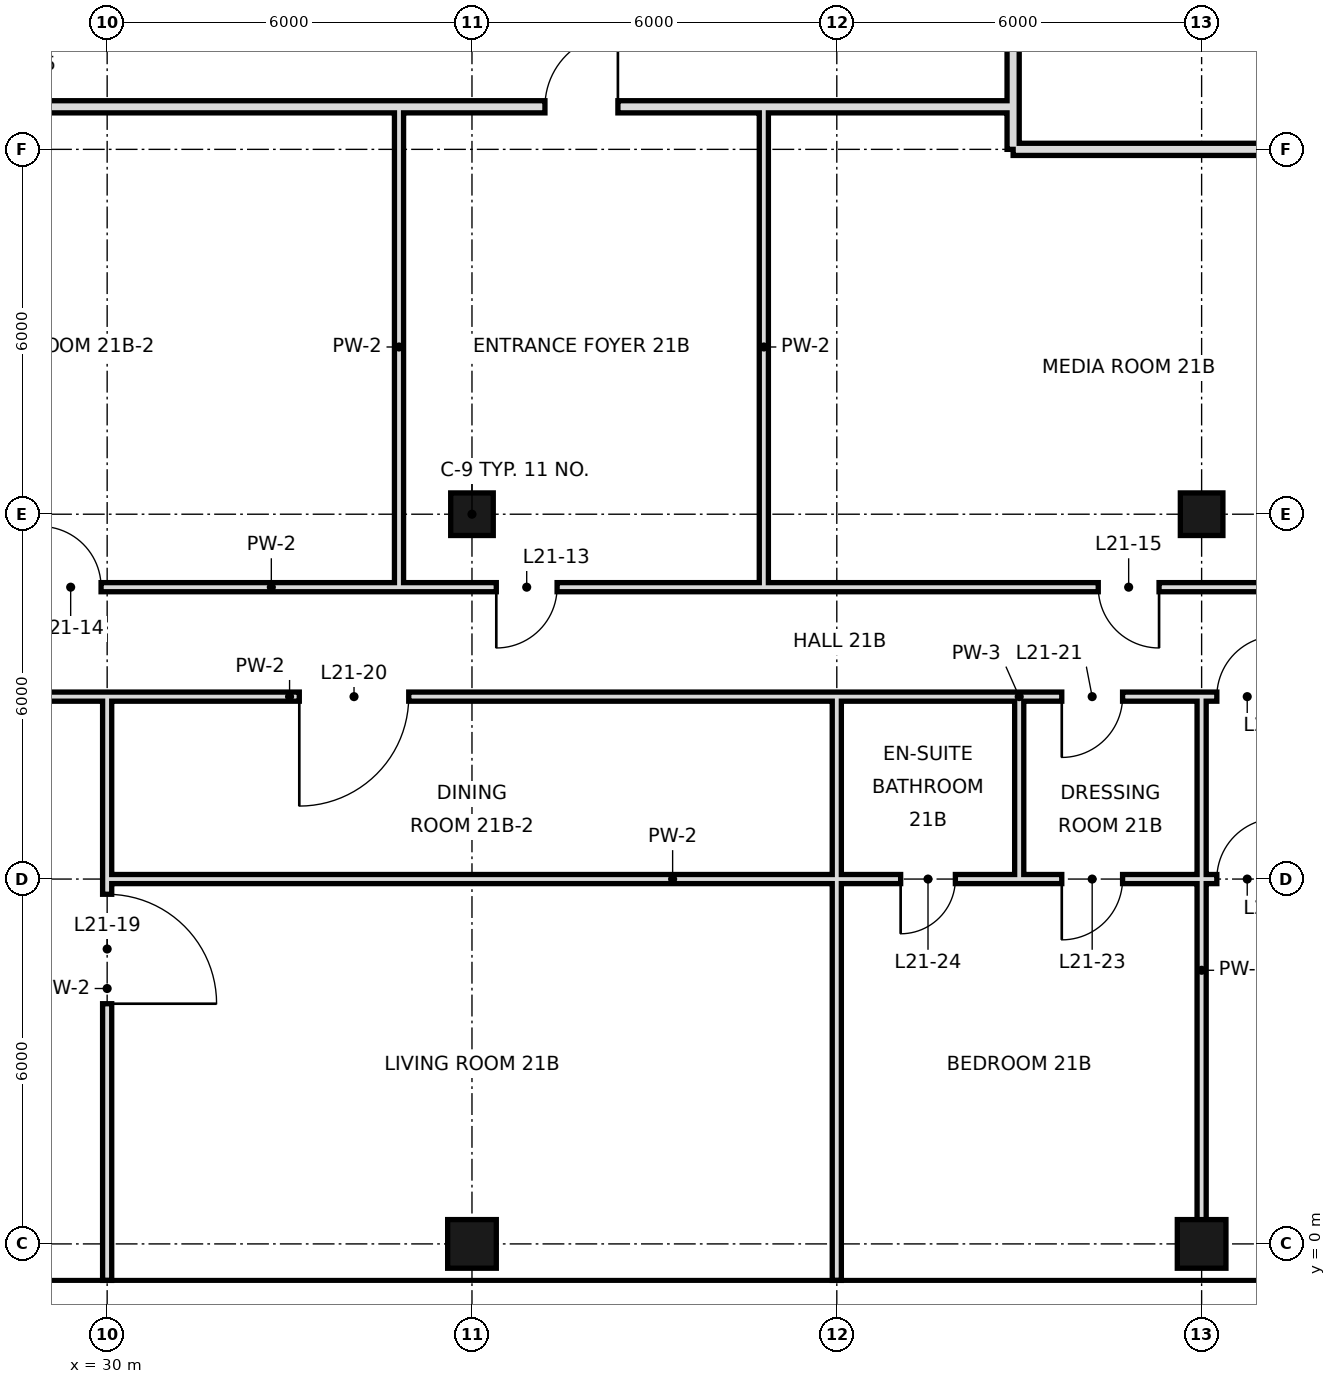
"""IFC4 building model, lengths in metres.
Left out: names, types, materials, properties, quantities, classifications, styles, units other than length and angle.
Written with IfcOpenShell. Run it as: python <this file> out.ifc"""

import sys

from ifc_helpers import new_model, si_unit, direction, frame, frame_2d, origin, origin_2d, place, context, subcontext, project, spatial, rectangle, hollow_rectangle, extrude, element, fill, save


model = new_model("IFC4")
c1 = context("Model", 3, precision=1e-05, world=origin(), true_north=direction((0.0, 1.0)))
c2 = subcontext(c1, "Body", "Model", "MODEL_VIEW")
j1 = project(units=[si_unit("LENGTHUNIT", "METRE"), si_unit("PLANEANGLEUNIT", "RADIAN")], contexts=[c1])
p1 = place(None, origin())
s1 = spatial("IfcSite", under=j1, at=p1, CompositionType="ELEMENT")
p2 = place(p1, origin())
s2 = spatial("IfcBuilding", under=s1, at=p2, CompositionType="ELEMENT")
p3 = place(p2, frame((0.0, 0.0, 99.8)))
s3 = spatial("IfcBuildingStorey", under=s2, at=p3, CompositionType="ELEMENT", Elevation=99.8)
p4 = place(p3, frame((36.0, 0.0, 0.0), z_axis=(0.0, 0.0, 1.0), x_axis=(1.0, 0.0, 0.0)))
e1 = element("IfcColumn", 1, at=p4, inside=s3, PredefinedType="COLUMN", context=c2, shape_type="SweptSolid", body=[
    extrude(hollow_rectangle(XDim=0.8, YDim=0.8, WallThickness=0.04, at=origin_2d()), origin(), (0.0, 0.0, 1.0), 3.6),
])
p5 = place(p3, frame((36.0, 12.0, 0.0), z_axis=(0.0, 0.0, 1.0), x_axis=(1.0, 0.0, 0.0)))
e2 = element("IfcColumn", 2, at=p5, inside=s3, PredefinedType="COLUMN", context=c2, shape_type="SweptSolid", body=[
    extrude(hollow_rectangle(XDim=0.7, YDim=0.7, WallThickness=0.036, at=origin_2d()), origin(), (0.0, 0.0, 1.0), 3.6),
])
p6 = place(p3, frame((48.0, 0.0, 0.0), z_axis=(0.0, 0.0, 1.0), x_axis=(1.0, 0.0, 0.0)))
e3 = element("IfcColumn", 3, at=p6, inside=s3, PredefinedType="COLUMN", context=c2, shape_type="SweptSolid", body=[
    extrude(hollow_rectangle(XDim=0.8, YDim=0.8, WallThickness=0.04, at=origin_2d()), origin(), (0.0, 0.0, 1.0), 3.6),
])
p7 = place(p3, frame((48.0, 12.0, 0.0), z_axis=(0.0, 0.0, 1.0), x_axis=(1.0, 0.0, 0.0)))
e4 = element("IfcColumn", 4, at=p7, inside=s3, PredefinedType="COLUMN", context=c2, shape_type="SweptSolid", body=[
    extrude(hollow_rectangle(XDim=0.7, YDim=0.7, WallThickness=0.036, at=origin_2d()), origin(), (0.0, 0.0, 1.0), 3.6),
])
p8 = place(p3, frame((30.0, -0.6, 0.0), z_axis=(0.0, 0.0, 1.0), x_axis=(0.0, 1.0, 0.0)))
e5 = element("IfcWall", 5, at=p8, inside=s3, PredefinedType="PARTITIONING", context=c2, shape_type="SweptSolid", body=[
    extrude(rectangle(XDim=9.6, YDim=0.15, at=frame_2d((4.8, 0.0))), origin(), (0.0, 0.0, 1.0), 3.42),
])
p9 = place(p8, frame((4.55, 0.0, 0.0)))
e6 = element("IfcOpeningElement", 6, at=p9, cuts=e5, PredefinedType="OPENING", context=c2, shape_type="SweptSolid", body=[
    extrude(rectangle(XDim=1.8, YDim=2.4, at=frame_2d((0.9, 1.2))), frame((0.0, 0.085, 0.0), z_axis=(0.0, -1.0, 0.0), x_axis=(1.0, 0.0, 0.0)), (0.0, 0.0, 1.0), 0.17),
])
for number, where, z_axis, x_axis in (
    (7, (34.8, 10.8, 0.0), (0.0, 0.0, 1.0), (0.0, 1.0, 0.0)),
    (8, (40.8, 10.8, 0.0), (0.0, 0.0, 1.0), (0.0, 1.0, 0.0)),
):
    element("IfcWall", number, at=place(p3, frame(where, z_axis=z_axis, x_axis=x_axis)), inside=s3, PredefinedType="PARTITIONING", context=c2, shape_type="SweptSolid", body=[
        extrude(rectangle(XDim=7.9, YDim=0.15, at=frame_2d((3.95, 0.0))), origin(), (0.0, 0.0, 1.0), 3.42),
    ])
p10 = place(p3, frame((42.0, -0.6, 0.0), z_axis=(0.0, 0.0, 1.0), x_axis=(0.0, 1.0, 0.0)))
e9 = element("IfcWall", 9, at=p10, inside=s3, PredefinedType="PARTITIONING", context=c2, shape_type="SweptSolid", body=[
    extrude(rectangle(XDim=6.6, YDim=0.15, at=frame_2d((3.3, 0.0))), origin(), (0.0, 0.0, 1.0), 3.42),
])
p11 = place(p3, frame((42.0, 6.0, 0.0), z_axis=(0.0, 0.0, 1.0), x_axis=(0.0, 1.0, 0.0)))
e10 = element("IfcWall", 10, at=p11, inside=s3, PredefinedType="PARTITIONING", context=c2, shape_type="SweptSolid", body=[
    extrude(rectangle(XDim=3.0, YDim=0.15, at=frame_2d((1.5, 0.0))), origin(), (0.0, 0.0, 1.0), 3.42),
])
p12 = place(p3, frame((44.9, 18.0, 0.0), z_axis=(0.0, 0.0, 1.0), x_axis=(0.0, 1.0, 0.0)))
e11 = element("IfcWall", 11, at=p12, inside=s3, PredefinedType="SOLIDWALL", context=c2, shape_type="SweptSolid", body=[
    extrude(rectangle(XDim=4.2, YDim=0.2, at=frame_2d((2.1, 0.0))), origin(), (0.0, 0.0, 1.0), 2.97),
])
p13 = place(p3, frame((45.0, 6.0, 0.0), z_axis=(0.0, 0.0, 1.0), x_axis=(0.0, 1.0, 0.0)))
e12 = element("IfcWall", 12, at=p13, inside=s3, PredefinedType="PARTITIONING", context=c2, shape_type="SweptSolid", body=[
    extrude(rectangle(XDim=3.0, YDim=0.15, at=frame_2d((1.5, 0.0))), origin(), (0.0, 0.0, 1.0), 3.42),
])
p14 = place(p3, frame((48.0, 0.0, 0.0), z_axis=(0.0, 0.0, 1.0), x_axis=(0.0, 1.0, 0.0)))
e13 = element("IfcWall", 13, at=p14, inside=s3, PredefinedType="PARTITIONING", context=c2, shape_type="SweptSolid", body=[
    extrude(rectangle(XDim=9.0, YDim=0.15, at=frame_2d((4.5, 0.0))), origin(), (0.0, 0.0, 1.0), 2.72),
])
p15 = place(p3, frame((12.6, 10.8, 0.0), z_axis=(0.0, 0.0, 1.0), x_axis=(1.0, 0.0, 0.0)))
e14 = element("IfcWall", 14, at=p15, inside=s3, PredefinedType="PARTITIONING", context=c2, shape_type="SweptSolid", body=[
    extrude(rectangle(XDim=40.2, YDim=0.15, at=frame_2d((20.1, 0.0))), origin(), (0.0, 0.0, 1.0), 3.42),
])
p16 = place(p15, frame((8.5, 0.0, 0.0)))
e15 = element("IfcOpeningElement", 15, at=p16, cuts=e14, PredefinedType="OPENING", context=c2, shape_type="SweptSolid", body=[
    extrude(rectangle(XDim=1.0, YDim=2.4, at=frame_2d((0.5, 1.2))), frame((0.0, 0.085, 0.0), z_axis=(0.0, -1.0, 0.0), x_axis=(1.0, 0.0, 0.0)), (0.0, 0.0, 1.0), 0.17),
])
p17 = place(p15, frame((1.78, 0.0, 0.0)))
e16 = element("IfcOpeningElement", 16, at=p17, cuts=e14, PredefinedType="OPENING", context=c2, shape_type="SweptSolid", body=[
    extrude(rectangle(XDim=1.0, YDim=2.4, at=frame_2d((0.5, 1.2))), frame((0.0, 0.085, 0.0), z_axis=(0.0, -1.0, 0.0), x_axis=(1.0, 0.0, 0.0)), (0.0, 0.0, 1.0), 0.17),
])
p18 = place(p15, frame((23.8, 0.0, 0.0)))
e17 = element("IfcOpeningElement", 17, at=p18, cuts=e14, PredefinedType="OPENING", context=c2, shape_type="SweptSolid", body=[
    extrude(rectangle(XDim=1.0, YDim=2.4, at=frame_2d((0.5, 1.2))), frame((0.0, 0.085, 0.0), z_axis=(0.0, -1.0, 0.0), x_axis=(1.0, 0.0, 0.0)), (0.0, 0.0, 1.0), 0.17),
])
p19 = place(p15, frame((16.3, 0.0, 0.0)))
e18 = element("IfcOpeningElement", 18, at=p19, cuts=e14, PredefinedType="OPENING", context=c2, shape_type="SweptSolid", body=[
    extrude(rectangle(XDim=1.0, YDim=2.4, at=frame_2d((0.5, 1.2))), frame((0.0, 0.085, 0.0), z_axis=(0.0, -1.0, 0.0), x_axis=(1.0, 0.0, 0.0)), (0.0, 0.0, 1.0), 0.17),
])
p20 = place(p15, frame((33.7, 0.0, 0.0)))
e19 = element("IfcOpeningElement", 19, at=p20, cuts=e14, PredefinedType="OPENING", context=c2, shape_type="SweptSolid", body=[
    extrude(rectangle(XDim=1.0, YDim=2.4, at=frame_2d((0.5, 1.2))), frame((0.0, 0.085, 0.0), z_axis=(0.0, -1.0, 0.0), x_axis=(1.0, 0.0, 0.0)), (0.0, 0.0, 1.0), 0.17),
])
p21 = place(p3, frame((44.9, 18.0, 0.0), z_axis=(0.0, 0.0, 1.0), x_axis=(1.0, 0.0, 0.0)))
e20 = element("IfcWall", 20, at=p21, inside=s3, PredefinedType="SOLIDWALL", context=c2, shape_type="SweptSolid", body=[
    extrude(rectangle(XDim=4.3, YDim=0.2, at=frame_2d((2.15, 0.0))), origin(), (0.0, 0.0, 1.0), 2.72),
])
p22 = place(p3, frame((12.6, 18.7, 0.0), z_axis=(0.0, 0.0, 1.0), x_axis=(1.0, 0.0, 0.0)))
e21 = element("IfcWall", 21, at=p22, inside=s3, PredefinedType="SOLIDWALL", context=c2, shape_type="SweptSolid", body=[
    extrude(rectangle(XDim=32.3, YDim=0.2, at=frame_2d((16.15, 0.0))), origin(), (0.0, 0.0, 1.0), 2.72),
])
p23 = place(p22, frame((7.78, 0.0, 0.0)))
e22 = element("IfcOpeningElement", 22, at=p23, cuts=e21, PredefinedType="OPENING", context=c2, shape_type="SweptSolid", body=[
    extrude(rectangle(XDim=1.2, YDim=2.4, at=frame_2d((0.6, 1.2))), frame((0.0, 0.11, 0.0), z_axis=(0.0, -1.0, 0.0), x_axis=(1.0, 0.0, 0.0)), (0.0, 0.0, 1.0), 0.22),
])
p24 = place(p22, frame((24.6, 0.0, 0.0)))
e23 = element("IfcOpeningElement", 23, at=p24, cuts=e21, PredefinedType="OPENING", context=c2, shape_type="SweptSolid", body=[
    extrude(rectangle(XDim=1.2, YDim=2.4, at=frame_2d((0.6, 1.2))), frame((0.0, 0.11, 0.0), z_axis=(0.0, -1.0, 0.0), x_axis=(1.0, 0.0, 0.0)), (0.0, 0.0, 1.0), 0.22),
])
p25 = place(p3, frame((30.0, 6.0, 0.0), z_axis=(0.0, 0.0, 1.0), x_axis=(1.0, 0.0, 0.0)))
e24 = element("IfcWall", 24, at=p25, inside=s3, PredefinedType="PARTITIONING", context=c2, shape_type="SweptSolid", body=[
    extrude(rectangle(XDim=12.0, YDim=0.15, at=frame_2d((6.0, 0.0))), origin(), (0.0, 0.0, 1.0), 2.72),
])
p26 = place(p3, frame((45.0, 6.0, 0.0), z_axis=(0.0, 0.0, 1.0), x_axis=(1.0, 0.0, 0.0)))
e25 = element("IfcWall", 25, at=p26, inside=s3, PredefinedType="PARTITIONING", context=c2, shape_type="SweptSolid", body=[
    extrude(rectangle(XDim=15.0, YDim=0.15, at=frame_2d((7.5, 0.0))), origin(), (0.0, 0.0, 1.0), 2.72),
])
p27 = place(p26, frame((0.7, 0.0, 0.0)))
e26 = element("IfcOpeningElement", 26, at=p27, cuts=e25, PredefinedType="OPENING", context=c2, shape_type="SweptSolid", body=[
    extrude(rectangle(XDim=1.0, YDim=2.4, at=frame_2d((0.5, 1.2))), frame((0.0, 0.085, 0.0), z_axis=(0.0, -1.0, 0.0), x_axis=(1.0, 0.0, 0.0)), (0.0, 0.0, 1.0), 0.17),
])
p28 = place(p26, frame((3.25, 0.0, 0.0)))
e27 = element("IfcOpeningElement", 27, at=p28, cuts=e25, PredefinedType="OPENING", context=c2, shape_type="SweptSolid", body=[
    extrude(rectangle(XDim=1.0, YDim=2.4, at=frame_2d((0.5, 1.2))), frame((0.0, 0.085, 0.0), z_axis=(0.0, -1.0, 0.0), x_axis=(1.0, 0.0, 0.0)), (0.0, 0.0, 1.0), 0.17),
])
p29 = place(p3, frame((42.0, 6.0, 0.0), z_axis=(0.0, 0.0, 1.0), x_axis=(1.0, 0.0, 0.0)))
e28 = element("IfcWall", 28, at=p29, inside=s3, PredefinedType="PARTITIONING", context=c2, shape_type="SweptSolid", body=[
    extrude(rectangle(XDim=3.0, YDim=0.15, at=frame_2d((1.5, 0.0))), origin(), (0.0, 0.0, 1.0), 2.72),
])
p30 = place(p29, frame((1.05, 0.0, 0.0)))
e29 = element("IfcOpeningElement", 29, at=p30, cuts=e28, PredefinedType="OPENING", context=c2, shape_type="SweptSolid", body=[
    extrude(rectangle(XDim=0.9, YDim=2.4, at=frame_2d((0.45, 1.2))), frame((0.0, 0.085, 0.0), z_axis=(0.0, -1.0, 0.0), x_axis=(1.0, 0.0, 0.0)), (0.0, 0.0, 1.0), 0.17),
])
p31 = place(p3, frame((24.0, 9.0, 0.0), z_axis=(0.0, 0.0, 1.0), x_axis=(1.0, 0.0, 0.0)))
e30 = element("IfcWall", 30, at=p31, inside=s3, PredefinedType="PARTITIONING", context=c2, shape_type="SweptSolid", body=[
    extrude(rectangle(XDim=18.0, YDim=0.15, at=frame_2d((9.0, 0.0))), origin(), (0.0, 0.0, 1.0), 3.42),
])
p32 = place(p31, frame((2.1, 0.0, 0.0)))
e31 = element("IfcOpeningElement", 31, at=p32, cuts=e30, PredefinedType="OPENING", context=c2, shape_type="SweptSolid", body=[
    extrude(rectangle(XDim=1.8, YDim=2.4, at=frame_2d((0.9, 1.2))), frame((0.0, 0.085, 0.0), z_axis=(0.0, -1.0, 0.0), x_axis=(1.0, 0.0, 0.0)), (0.0, 0.0, 1.0), 0.17),
])
p33 = place(p31, frame((9.16, 0.0, 0.0)))
e32 = element("IfcOpeningElement", 32, at=p33, cuts=e30, PredefinedType="OPENING", context=c2, shape_type="SweptSolid", body=[
    extrude(rectangle(XDim=1.8, YDim=2.4, at=frame_2d((0.9, 1.2))), frame((0.0, 0.085, 0.0), z_axis=(0.0, -1.0, 0.0), x_axis=(1.0, 0.0, 0.0)), (0.0, 0.0, 1.0), 0.17),
])
p34 = place(p3, frame((45.0, 9.0, 0.0), z_axis=(0.0, 0.0, 1.0), x_axis=(1.0, 0.0, 0.0)))
e33 = element("IfcWall", 33, at=p34, inside=s3, PredefinedType="PARTITIONING", context=c2, shape_type="SweptSolid", body=[
    extrude(rectangle(XDim=15.6, YDim=0.15, at=frame_2d((7.8, 0.0))), origin(), (0.0, 0.0, 1.0), 3.42),
])
p35 = place(p34, frame((0.7, 0.0, 0.0)))
e34 = element("IfcOpeningElement", 34, at=p35, cuts=e33, PredefinedType="OPENING", context=c2, shape_type="SweptSolid", body=[
    extrude(rectangle(XDim=1.0, YDim=2.4, at=frame_2d((0.5, 1.2))), frame((0.0, 0.085, 0.0), z_axis=(0.0, -1.0, 0.0), x_axis=(1.0, 0.0, 0.0)), (0.0, 0.0, 1.0), 0.17),
])
p36 = place(p34, frame((3.25, 0.0, 0.0)))
e35 = element("IfcOpeningElement", 35, at=p36, cuts=e33, PredefinedType="OPENING", context=c2, shape_type="SweptSolid", body=[
    extrude(rectangle(XDim=1.0, YDim=2.4, at=frame_2d((0.5, 1.2))), frame((0.0, 0.085, 0.0), z_axis=(0.0, -1.0, 0.0), x_axis=(1.0, 0.0, 0.0)), (0.0, 0.0, 1.0), 0.17),
])
p37 = place(p3, frame((42.0, 9.0, 0.0), z_axis=(0.0, 0.0, 1.0), x_axis=(1.0, 0.0, 0.0)))
e36 = element("IfcWall", 36, at=p37, inside=s3, PredefinedType="PARTITIONING", context=c2, shape_type="SweptSolid", body=[
    extrude(rectangle(XDim=3.0, YDim=0.15, at=frame_2d((1.5, 0.0))), origin(), (0.0, 0.0, 1.0), 3.42),
])
p38 = place(p18, frame((1.0, 0.0, 0.0), z_axis=(0.0, 0.0, 1.0), x_axis=(-1.0, 0.0, 0.0)))
e37 = element("IfcDoor", 37, at=p38, inside=s3, OperationType="SINGLE_SWING_RIGHT", PredefinedType="DOOR", context=c2, shape_type="SweptSolid", body=[
    extrude(rectangle(XDim=1.0, YDim=2.4, at=frame_2d((0.5, 1.2))), frame((0.0, 0.025, 0.0), z_axis=(0.0, -1.0, 0.0), x_axis=(1.0, 0.0, 0.0)), (0.0, 0.0, 1.0), 0.05),
])
fill(e17, e37)
p39 = place(p19, origin())
e38 = element("IfcDoor", 38, at=p39, inside=s3, OperationType="SINGLE_SWING_LEFT", PredefinedType="DOOR", context=c2, shape_type="SweptSolid", body=[
    extrude(rectangle(XDim=1.0, YDim=2.4, at=frame_2d((0.5, 1.2))), frame((0.0, 0.025, 0.0), z_axis=(0.0, -1.0, 0.0), x_axis=(1.0, 0.0, 0.0)), (0.0, 0.0, 1.0), 0.05),
])
fill(e18, e38)
p40 = place(p20, origin())
e39 = element("IfcDoor", 39, at=p40, inside=s3, OperationType="SINGLE_SWING_RIGHT", PredefinedType="DOOR", context=c2, shape_type="SweptSolid", body=[
    extrude(rectangle(XDim=1.0, YDim=2.4, at=frame_2d((0.5, 1.2))), frame((0.0, 0.025, 0.0), z_axis=(0.0, -1.0, 0.0), x_axis=(1.0, 0.0, 0.0)), (0.0, 0.0, 1.0), 0.05),
])
fill(e19, e39)
p41 = place(p9, frame((1.8, 0.0, 0.0), z_axis=(0.0, 0.0, 1.0), x_axis=(-1.0, 0.0, 0.0)))
e40 = element("IfcDoor", 40, at=p41, inside=s3, OperationType="SINGLE_SWING_RIGHT", PredefinedType="DOOR", context=c2, shape_type="SweptSolid", body=[
    extrude(rectangle(XDim=1.8, YDim=2.4, at=frame_2d((0.9, 1.2))), frame((0.0, 0.025, 0.0), z_axis=(0.0, -1.0, 0.0), x_axis=(1.0, 0.0, 0.0)), (0.0, 0.0, 1.0), 0.05),
])
fill(e6, e40)
p42 = place(p33, frame((1.8, 0.0, 0.0), z_axis=(0.0, 0.0, 1.0), x_axis=(-1.0, 0.0, 0.0)))
e41 = element("IfcDoor", 41, at=p42, inside=s3, OperationType="SINGLE_SWING_RIGHT", PredefinedType="DOOR", context=c2, shape_type="SweptSolid", body=[
    extrude(rectangle(XDim=1.8, YDim=2.4, at=frame_2d((0.9, 1.2))), frame((0.0, 0.025, 0.0), z_axis=(0.0, -1.0, 0.0), x_axis=(1.0, 0.0, 0.0)), (0.0, 0.0, 1.0), 0.05),
])
fill(e32, e41)
p43 = place(p35, frame((1.0, 0.0, 0.0), z_axis=(0.0, 0.0, 1.0), x_axis=(-1.0, 0.0, 0.0)))
e42 = element("IfcDoor", 42, at=p43, inside=s3, OperationType="SINGLE_SWING_RIGHT", PredefinedType="DOOR", context=c2, shape_type="SweptSolid", body=[
    extrude(rectangle(XDim=1.0, YDim=2.4, at=frame_2d((0.5, 1.2))), frame((0.0, 0.025, 0.0), z_axis=(0.0, -1.0, 0.0), x_axis=(1.0, 0.0, 0.0)), (0.0, 0.0, 1.0), 0.05),
])
fill(e34, e42)
p44 = place(p36, frame((1.0, 0.0, 0.0), z_axis=(0.0, 0.0, 1.0), x_axis=(-1.0, 0.0, 0.0)))
e43 = element("IfcDoor", 43, at=p44, inside=s3, OperationType="SINGLE_SWING_LEFT", PredefinedType="DOOR", context=c2, shape_type="SweptSolid", body=[
    extrude(rectangle(XDim=1.0, YDim=2.4, at=frame_2d((0.5, 1.2))), frame((0.0, 0.025, 0.0), z_axis=(0.0, -1.0, 0.0), x_axis=(1.0, 0.0, 0.0)), (0.0, 0.0, 1.0), 0.05),
])
fill(e35, e43)
p45 = place(p27, frame((1.0, 0.0, 0.0), z_axis=(0.0, 0.0, 1.0), x_axis=(-1.0, 0.0, 0.0)))
e44 = element("IfcDoor", 44, at=p45, inside=s3, OperationType="SINGLE_SWING_RIGHT", PredefinedType="DOOR", context=c2, shape_type="SweptSolid", body=[
    extrude(rectangle(XDim=1.0, YDim=2.4, at=frame_2d((0.5, 1.2))), frame((0.0, 0.025, 0.0), z_axis=(0.0, -1.0, 0.0), x_axis=(1.0, 0.0, 0.0)), (0.0, 0.0, 1.0), 0.05),
])
fill(e26, e44)
p46 = place(p30, frame((0.9, 0.0, 0.0), z_axis=(0.0, 0.0, 1.0), x_axis=(-1.0, 0.0, 0.0)))
e45 = element("IfcDoor", 45, at=p46, inside=s3, OperationType="SINGLE_SWING_RIGHT", PredefinedType="DOOR", context=c2, shape_type="SweptSolid", body=[
    extrude(rectangle(XDim=0.9, YDim=2.4, at=frame_2d((0.45, 1.2))), frame((0.0, 0.025, 0.0), z_axis=(0.0, -1.0, 0.0), x_axis=(1.0, 0.0, 0.0)), (0.0, 0.0, 1.0), 0.05),
])
fill(e29, e45)
p47 = place(p28, frame((1.0, 0.0, 0.0), z_axis=(0.0, 0.0, 1.0), x_axis=(-1.0, 0.0, 0.0)))
e46 = element("IfcDoor", 46, at=p47, inside=s3, OperationType="SINGLE_SWING_LEFT", PredefinedType="DOOR", context=c2, shape_type="SweptSolid", body=[
    extrude(rectangle(XDim=1.0, YDim=2.4, at=frame_2d((0.5, 1.2))), frame((0.0, 0.025, 0.0), z_axis=(0.0, -1.0, 0.0), x_axis=(1.0, 0.0, 0.0)), (0.0, 0.0, 1.0), 0.05),
])
fill(e27, e46)
p48 = place(p24, frame((1.2, 0.0, 0.0), z_axis=(0.0, 0.0, 1.0), x_axis=(-1.0, 0.0, 0.0)))
e47 = element("IfcDoor", 47, at=p48, inside=s3, OperationType="SINGLE_SWING_LEFT", PredefinedType="DOOR", context=c2, shape_type="SweptSolid", body=[
    extrude(rectangle(XDim=1.2, YDim=2.4, at=frame_2d((0.6, 1.2))), frame((0.0, 0.025, 0.0), z_axis=(0.0, -1.0, 0.0), x_axis=(1.0, 0.0, 0.0)), (0.0, 0.0, 1.0), 0.05),
])
fill(e23, e47)
save(model, sys.argv[1])
